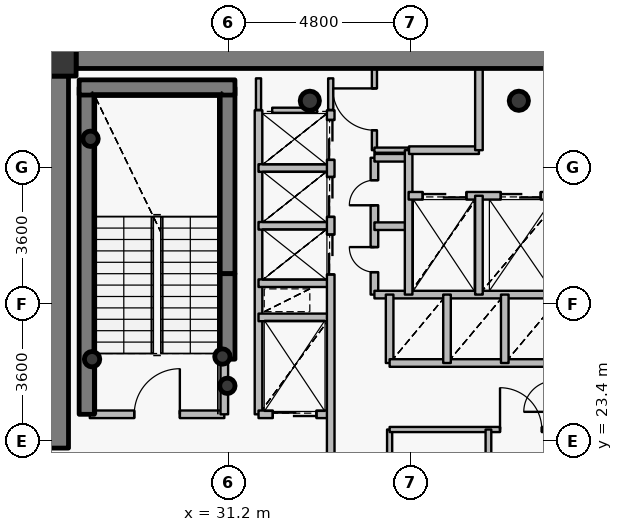
"""IFC4 building model, lengths in metres.
Left out: names, types, materials, properties, quantities, classifications, styles, units other than length and angle.
Written with IfcOpenShell. Run it as: python <this file> out.ifc"""

import sys

from ifc_helpers import new_model, si_unit, direction, frame, frame_2d, origin, origin_2d, place, context, subcontext, project, spatial, rectangle, hollow_circle, extrude, source, transform, mapped, element, fill, save


model = new_model("IFC4")
c1 = context("Model", 3, precision=1e-05, world=origin(), true_north=direction((0.0, 1.0)))
c2 = subcontext(c1, "Body", "Model", "MODEL_VIEW")
j1 = project(units=[si_unit("LENGTHUNIT", "METRE"), si_unit("PLANEANGLEUNIT", "RADIAN")], contexts=[c1])
p1 = place(None, origin())
s1 = spatial("IfcSite", under=j1, at=p1, CompositionType="ELEMENT")
p2 = place(p1, origin())
s2 = spatial("IfcBuilding", under=s1, at=p2, CompositionType="ELEMENT")
p3 = place(p2, frame((0.0, 0.0, 193.65)))
s3 = spatial("IfcBuildingStorey", under=s2, at=p3, CompositionType="ELEMENT", Elevation=193.65)
p4 = place(p3, frame((26.6, 33.6, 0.0), z_axis=(0.0, 0.0, 1.0), x_axis=(1.0, 0.0, 0.0)))
e1 = element("IfcColumn", 1, at=p4, inside=s3, PredefinedType="COLUMN", context=c2, shape_type="SweptSolid", body=[
    extrude(rectangle(XDim=1.2, YDim=1.2, at=origin_2d()), origin(), (0.0, 0.0, 1.0), 3.75),
])
for number, where, z_axis, x_axis in (
    (2, (38.85, 32.35, 0.0), (0.0, 0.0, 1.0), (1.0, 0.0, 0.0)),
    (3, (33.35, 32.35, 0.0), (0.0, 0.0, 1.0), (1.0, 0.0, 0.0)),
):
    element("IfcColumn", number, at=place(p3, frame(where, z_axis=z_axis, x_axis=x_axis)), inside=s3, PredefinedType="COLUMN", context=c2, shape_type="SweptSolid", body=[
        extrude(hollow_circle(Radius=0.254, WallThickness=0.02, at=origin_2d()), origin(), (0.0, 0.0, 1.0), 3.75),
    ])
p5 = place(p3, frame((27.48, 24.1, 0.0), z_axis=(0.0, 0.0, 1.0), x_axis=(0.0, 1.0, 0.0)))
e4 = element("IfcWall", 4, at=p5, inside=s3, PredefinedType="SHEAR", context=c2, shape_type="SweptSolid", body=[
    extrude(rectangle(XDim=8.6, YDim=0.4, at=frame_2d((4.3, 0.0))), origin(), (0.0, 0.0, 1.0), 3.75),
])
p6 = place(p3, frame((31.18, 27.8, 0.0), z_axis=(0.0, 0.0, 1.0), x_axis=(0.0, 1.0, 0.0)))
e5 = element("IfcWall", 5, at=p6, inside=s3, PredefinedType="SHEAR", context=c2, shape_type="SweptSolid", body=[
    extrude(rectangle(XDim=4.9, YDim=0.4, at=frame_2d((2.45, 0.0))), origin(), (0.0, 0.0, 1.0), 3.75),
])
p7 = place(p3, frame((27.28, 32.7, 0.0), z_axis=(0.0, 0.0, 1.0), x_axis=(1.0, 0.0, 0.0)))
e6 = element("IfcWall", 6, at=p7, inside=s3, PredefinedType="SHEAR", context=c2, shape_type="SweptSolid", body=[
    extrude(rectangle(XDim=4.1, YDim=0.4, at=frame_2d((2.05, 0.0))), origin(), (0.0, 0.0, 1.0), 3.75),
])
for number, where, z_axis, x_axis in (
    (7, (27.58, 31.35, 0.0), (0.0, 0.0, 1.0), (1.0, 0.0, 0.0)),
    (8, (31.05, 25.62, 0.0), (0.0, 0.0, 1.0), (1.0, 0.0, 0.0)),
    (9, (31.18, 24.85, 0.0), (0.0, 0.0, 1.0), (1.0, 0.0, 0.0)),
    (10, (27.62, 25.55, 0.0), (0.0, 0.0, 1.0), (1.0, 0.0, 0.0)),
):
    element("IfcColumn", number, at=place(p3, frame(where, z_axis=z_axis, x_axis=x_axis)), inside=s3, PredefinedType="COLUMN", context=c2, shape_type="SweptSolid", body=[
        extrude(hollow_circle(Radius=0.203, WallThickness=0.016, at=origin_2d()), origin(), (0.0, 0.0, 1.0), 3.75),
    ])
p8 = place(p3, frame((27.2, 33.6, 0.0), z_axis=(0.0, 0.0, 1.0), x_axis=(1.0, 0.0, 0.0)))
e11 = element("IfcWall", 11, at=p8, inside=s3, PredefinedType="SHEAR", context=c2, shape_type="SweptSolid", body=[
    extrude(rectangle(XDim=17.6, YDim=0.8, at=frame_2d((8.8, 0.0))), origin(), (0.0, 0.0, 1.0), 2.95),
])
p9 = place(p8, frame((13.45, 0.0, 0.0)))
e12 = element("IfcOpeningElement", 12, at=p9, cuts=e11, PredefinedType="OPENING", context=c2, shape_type="SweptSolid", body=[
    extrude(rectangle(XDim=1.15, YDim=2.15, at=origin_2d()), frame((0.575, 0.41, 1.075), z_axis=(0.0, -1.0, 0.0), x_axis=(1.0, 0.0, 0.0)), (0.0, 0.0, 1.0), 0.82),
])
p10 = place(p3, frame((26.6, 21.0, 0.0), z_axis=(0.0, 0.0, 1.0), x_axis=(0.0, 1.0, 0.0)))
e13 = element("IfcWall", 13, at=p10, inside=s3, PredefinedType="SHEAR", context=c2, shape_type="SweptSolid", body=[
    extrude(rectangle(XDim=12.0, YDim=0.8, at=frame_2d((6.0, 0.0))), origin(), (0.0, 0.0, 1.0), 2.95),
])
p11 = place(p10, frame((1.061, 0.0, 0.0)))
e14 = element("IfcOpeningElement", 14, at=p11, cuts=e13, PredefinedType="OPENING", context=c2, shape_type="SweptSolid", body=[
    extrude(rectangle(XDim=1.15, YDim=2.15, at=origin_2d()), frame((0.575, 0.41, 1.075), z_axis=(0.0, -1.0, 0.0), x_axis=(1.0, 0.0, 0.0)), (0.0, 0.0, 1.0), 0.82),
])
p12 = place(p3, frame((31.18, 25.55, 0.0), z_axis=(0.0, 0.0, 1.0), x_axis=(0.0, 1.0, 0.0)))
e15 = element("IfcWall", 15, at=p12, inside=s3, PredefinedType="SHEAR", context=c2, shape_type="SweptSolid", body=[
    extrude(rectangle(XDim=2.25, YDim=0.4, at=frame_2d((1.125, 0.0))), origin(), (0.0, 0.0, 1.0), 3.1),
])
p13 = place(p3, frame((27.56, 24.1, 0.0), z_axis=(0.0, 0.0, 1.0), x_axis=(1.0, 0.0, 0.0)))
e16 = element("IfcWall", 16, at=p13, inside=s3, PredefinedType="PARTITIONING", context=c2, shape_type="SweptSolid", body=[
    extrude(rectangle(XDim=3.54, YDim=0.2, at=frame_2d((1.77, 0.0))), origin(), (0.0, 0.0, 1.0), 3.5),
])
p14 = place(p13, frame((1.17, 0.0, 0.0)))
e17 = element("IfcOpeningElement", 17, at=p14, cuts=e16, PredefinedType="OPENING", context=c2, shape_type="SweptSolid", body=[
    extrude(rectangle(XDim=1.2, YDim=2.15, at=origin_2d()), frame((0.6, 0.11, 1.075), z_axis=(0.0, -1.0, 0.0), x_axis=(1.0, 0.0, 0.0)), (0.0, 0.0, 1.0), 0.22),
])
p15 = place(p3, frame((31.1, 24.1, 0.0), z_axis=(0.0, 0.0, 1.0), x_axis=(0.0, 1.0, 0.0)))
e18 = element("IfcWall", 18, at=p15, inside=s3, PredefinedType="PARTITIONING", context=c2, shape_type="SweptSolid", body=[
    extrude(rectangle(XDim=1.44, YDim=0.2, at=frame_2d((0.72, 0.0))), origin(), (0.0, 0.0, 1.0), 3.5),
])
p16 = place(p3, frame((32.0, 24.1, 0.0), z_axis=(0.0, 0.0, 1.0), x_axis=(0.0, 1.0, 0.0)))
e19 = element("IfcWall", 19, at=p16, inside=s3, PredefinedType="PARTITIONING", context=c2, shape_type="SweptSolid", body=[
    extrude(rectangle(XDim=8.0, YDim=0.2, at=frame_2d((4.0, 0.0))), origin(), (0.0, 0.0, 1.0), 3.5),
])
p17 = place(p3, frame((32.0, 24.1, 0.0), z_axis=(0.0, 0.0, 1.0), x_axis=(1.0, 0.0, 0.0)))
e20 = element("IfcWall", 20, at=p17, inside=s3, PredefinedType="PARTITIONING", context=c2, shape_type="SweptSolid", body=[
    extrude(rectangle(XDim=1.9, YDim=0.2, at=frame_2d((0.95, 0.0))), origin(), (0.0, 0.0, 1.0), 3.085),
])
p18 = place(p17, frame((0.375, 0.0, 0.0)))
e21 = element("IfcOpeningElement", 21, at=p18, cuts=e20, PredefinedType="OPENING", context=c2, shape_type="SweptSolid", body=[
    extrude(rectangle(XDim=1.15, YDim=2.15, at=origin_2d()), frame((0.575, 0.11, 1.075), z_axis=(0.0, -1.0, 0.0), x_axis=(1.0, 0.0, 0.0)), (0.0, 0.0, 1.0), 0.22),
])
for number, where, z_axis, x_axis in (
    (22, (32.0, 26.65, 0.0), (0.0, 0.0, 1.0), (1.0, 0.0, 0.0)),
    (23, (32.0, 27.55, 0.0), (0.0, 0.0, 1.0), (1.0, 0.0, 0.0)),
    (24, (32.0, 29.06, 0.0), (0.0, 0.0, 1.0), (1.0, 0.0, 0.0)),
    (25, (32.0, 30.58, 0.0), (0.0, 0.0, 1.0), (1.0, 0.0, 0.0)),
):
    element("IfcWall", number, at=place(p3, frame(where, z_axis=z_axis, x_axis=x_axis)), inside=s3, PredefinedType="PARTITIONING", context=c2, shape_type="SweptSolid", body=[
        extrude(rectangle(XDim=1.9, YDim=0.2, at=frame_2d((0.95, 0.0))), origin(), (0.0, 0.0, 1.0), 3.085),
    ])
p19 = place(p3, frame((33.9, 20.8, 0.0), z_axis=(0.0, 0.0, 1.0), x_axis=(0.0, 1.0, 0.0)))
e26 = element("IfcWall", 26, at=p19, inside=s3, PredefinedType="PARTITIONING", context=c2, shape_type="SweptSolid", body=[
    extrude(rectangle(XDim=11.3, YDim=0.2, at=frame_2d((5.65, 0.0))), origin(), (0.0, 0.0, 1.0), 3.085),
])
p20 = place(p19, frame((6.98, 0.0, 0.0)))
e27 = element("IfcOpeningElement", 27, at=p20, cuts=e26, PredefinedType="OPENING", context=c2, shape_type="SweptSolid", body=[
    extrude(rectangle(XDim=1.05, YDim=2.15, at=origin_2d()), frame((0.525, 0.11, 1.075), z_axis=(0.0, -1.0, 0.0), x_axis=(1.0, 0.0, 0.0)), (0.0, 0.0, 1.0), 0.22),
])
p21 = place(p19, frame((8.495, 0.0, 0.0)))
e28 = element("IfcOpeningElement", 28, at=p21, cuts=e26, PredefinedType="OPENING", context=c2, shape_type="SweptSolid", body=[
    extrude(rectangle(XDim=1.05, YDim=2.15, at=origin_2d()), frame((0.525, 0.11, 1.075), z_axis=(0.0, -1.0, 0.0), x_axis=(1.0, 0.0, 0.0)), (0.0, 0.0, 1.0), 0.22),
])
p22 = place(p19, frame((9.995, 0.0, 0.0)))
e29 = element("IfcOpeningElement", 29, at=p22, cuts=e26, PredefinedType="OPENING", context=c2, shape_type="SweptSolid", body=[
    extrude(rectangle(XDim=1.05, YDim=2.15, at=origin_2d()), frame((0.525, 0.11, 1.075), z_axis=(0.0, -1.0, 0.0), x_axis=(1.0, 0.0, 0.0)), (0.0, 0.0, 1.0), 0.22),
])
p23 = place(p3, frame((35.05, 27.25, 0.0), z_axis=(0.0, 0.0, 1.0), x_axis=(0.0, 1.0, 0.0)))
e30 = element("IfcWall", 30, at=p23, inside=s3, PredefinedType="PARTITIONING", context=c2, shape_type="SweptSolid", body=[
    extrude(rectangle(XDim=3.6, YDim=0.2, at=frame_2d((1.8, 0.0))), origin(), (0.0, 0.0, 1.0), 3.5),
])
p24 = place(p23, frame((0.59, 0.0, 0.0)))
e31 = element("IfcOpeningElement", 31, at=p24, cuts=e30, PredefinedType="OPENING", context=c2, shape_type="SweptSolid", body=[
    extrude(rectangle(XDim=0.66, YDim=2.05, at=origin_2d()), frame((0.33, 0.11, 1.025), z_axis=(0.0, -1.0, 0.0), x_axis=(1.0, 0.0, 0.0)), (0.0, 0.0, 1.0), 0.22),
])
p25 = place(p23, frame((2.35, 0.0, 0.0)))
e32 = element("IfcOpeningElement", 32, at=p25, cuts=e30, PredefinedType="OPENING", context=c2, shape_type="SweptSolid", body=[
    extrude(rectangle(XDim=0.66, YDim=2.05, at=origin_2d()), frame((0.33, 0.11, 1.025), z_axis=(0.0, -1.0, 0.0), x_axis=(1.0, 0.0, 0.0)), (0.0, 0.0, 1.0), 0.22),
])
p26 = place(p3, frame((35.05, 27.25, 0.0), z_axis=(0.0, 0.0, 1.0), x_axis=(1.0, 0.0, 0.0)))
e33 = element("IfcWall", 33, at=p26, inside=s3, PredefinedType="PARTITIONING", context=c2, shape_type="SweptSolid", body=[
    extrude(rectangle(XDim=4.95, YDim=0.2, at=frame_2d((2.475, 0.0))), origin(), (0.0, 0.0, 1.0), 3.085),
])
for number, where, z_axis, x_axis in (
    (34, (35.05, 29.05, 0.0), (0.0, 0.0, 1.0), (1.0, 0.0, 0.0)),
    (35, (35.05, 30.85, 0.0), (0.0, 0.0, 1.0), (1.0, 0.0, 0.0)),
):
    element("IfcWall", number, at=place(p3, frame(where, z_axis=z_axis, x_axis=x_axis)), inside=s3, PredefinedType="PARTITIONING", context=c2, shape_type="SweptSolid", body=[
        extrude(rectangle(XDim=0.9, YDim=0.2, at=frame_2d((0.45, 0.0))), origin(), (0.0, 0.0, 1.0), 3.5),
    ])
p27 = place(p3, frame((35.05, 31.05, 0.0), z_axis=(0.0, 0.0, 1.0), x_axis=(0.0, 1.0, 0.0)))
e36 = element("IfcWall", 36, at=p27, inside=s3, PredefinedType="PARTITIONING", context=c2, shape_type="SweptSolid", body=[
    extrude(rectangle(XDim=2.15, YDim=0.135, at=frame_2d((1.075, 0.0))), origin(), (0.0, 0.0, 1.0), 3.085),
])
p28 = place(p27, frame((0.525, 0.0, 0.0)))
e37 = element("IfcOpeningElement", 37, at=p28, cuts=e36, PredefinedType="OPENING", context=c2, shape_type="SweptSolid", body=[
    extrude(rectangle(XDim=1.1, YDim=2.15, at=origin_2d()), frame((0.55, 0.078, 1.075), z_axis=(0.0, -1.0, 0.0), x_axis=(1.0, 0.0, 0.0)), (0.0, 0.0, 1.0), 0.155),
])
p29 = place(p3, frame((35.05, 31.05, 0.0), z_axis=(0.0, 0.0, 1.0), x_axis=(1.0, 0.0, 0.0)))
e38 = element("IfcWall", 38, at=p29, inside=s3, PredefinedType="PARTITIONING", context=c2, shape_type="SweptSolid", body=[
    extrude(rectangle(XDim=0.9, YDim=0.135, at=frame_2d((0.45, 0.0))), origin(), (0.0, 0.0, 1.0), 3.5),
])
p30 = place(p3, frame((35.45, 20.8, 0.0), z_axis=(0.0, 0.0, 1.0), x_axis=(0.0, 1.0, 0.0)))
e39 = element("IfcWall", 39, at=p30, inside=s3, PredefinedType="PARTITIONING", context=c2, shape_type="SweptSolid", body=[
    extrude(rectangle(XDim=2.9, YDim=0.135, at=frame_2d((1.45, 0.0))), origin(), (0.0, 0.0, 1.0), 3.085),
])
p31 = place(p30, frame((0.9, 0.0, 0.0)))
e40 = element("IfcOpeningElement", 40, at=p31, cuts=e39, PredefinedType="OPENING", context=c2, shape_type="SweptSolid", body=[
    extrude(rectangle(XDim=1.1, YDim=2.15, at=origin_2d()), frame((0.55, 0.078, 1.075), z_axis=(0.0, -1.0, 0.0), x_axis=(1.0, 0.0, 0.0)), (0.0, 0.0, 1.0), 0.155),
])
p32 = place(p3, frame((35.45, 23.7, 0.0), z_axis=(0.0, 0.0, 1.0), x_axis=(1.0, 0.0, 0.0)))
e41 = element("IfcWall", 41, at=p32, inside=s3, PredefinedType="PARTITIONING", context=c2, shape_type="SweptSolid", body=[
    extrude(rectangle(XDim=4.35, YDim=0.135, at=frame_2d((2.175, 0.0))), origin(), (0.0, 0.0, 1.0), 3.085),
])
p33 = place(p32, frame((2.905, 0.0, 0.0)))
e42 = element("IfcOpeningElement", 42, at=p33, cuts=e41, PredefinedType="OPENING", context=c2, shape_type="SweptSolid", body=[
    extrude(rectangle(XDim=1.1, YDim=2.15, at=origin_2d()), frame((0.55, 0.078, 1.075), z_axis=(0.0, -1.0, 0.0), x_axis=(1.0, 0.0, 0.0)), (0.0, 0.0, 1.0), 0.155),
])
p34 = place(p3, frame((35.45, 25.45, 0.0), z_axis=(0.0, 0.0, 1.0), x_axis=(0.0, 1.0, 0.0)))
e43 = element("IfcWall", 43, at=p34, inside=s3, PredefinedType="PARTITIONING", context=c2, shape_type="SweptSolid", body=[
    extrude(rectangle(XDim=1.8, YDim=0.2, at=frame_2d((0.9, 0.0))), origin(), (0.0, 0.0, 1.0), 3.5),
])
p35 = place(p3, frame((35.45, 25.45, 0.0), z_axis=(0.0, 0.0, 1.0), x_axis=(1.0, 0.0, 0.0)))
e44 = element("IfcWall", 44, at=p35, inside=s3, PredefinedType="PARTITIONING", context=c2, shape_type="SweptSolid", body=[
    extrude(rectangle(XDim=4.55, YDim=0.2, at=frame_2d((2.275, 0.0))), origin(), (0.0, 0.0, 1.0), 3.085),
])
p36 = place(p3, frame((35.95, 27.25, 0.0), z_axis=(0.0, 0.0, 1.0), x_axis=(0.0, 1.0, 0.0)))
e45 = element("IfcWall", 45, at=p36, inside=s3, PredefinedType="PARTITIONING", context=c2, shape_type="SweptSolid", body=[
    extrude(rectangle(XDim=3.8, YDim=0.2, at=frame_2d((1.9, 0.0))), origin(), (0.0, 0.0, 1.0), 3.5),
])
p37 = place(p3, frame((35.95, 29.85, 0.0), z_axis=(0.0, 0.0, 1.0), x_axis=(1.0, 0.0, 0.0)))
e46 = element("IfcWall", 46, at=p37, inside=s3, PredefinedType="PARTITIONING", context=c2, shape_type="SweptSolid", body=[
    extrude(rectangle(XDim=8.49, YDim=0.2, at=frame_2d((4.245, 0.0))), origin(), (0.0, 0.0, 1.0), 3.085),
])
p38 = place(p37, frame((6.1, 0.0, 0.0)))
e47 = element("IfcOpeningElement", 47, at=p38, cuts=e46, PredefinedType="OPENING", context=c2, shape_type="SweptSolid", body=[
    extrude(rectangle(XDim=1.2, YDim=2.15, at=origin_2d()), frame((0.6, 0.11, 1.075), z_axis=(0.0, -1.0, 0.0), x_axis=(1.0, 0.0, 0.0)), (0.0, 0.0, 1.0), 0.22),
])
p39 = place(p37, frame((0.37, 0.0, 0.0)))
e48 = element("IfcOpeningElement", 48, at=p39, cuts=e46, PredefinedType="OPENING", context=c2, shape_type="SweptSolid", body=[
    extrude(rectangle(XDim=1.15, YDim=2.15, at=origin_2d()), frame((0.575, 0.11, 1.075), z_axis=(0.0, -1.0, 0.0), x_axis=(1.0, 0.0, 0.0)), (0.0, 0.0, 1.0), 0.22),
])
p40 = place(p37, frame((2.425, 0.0, 0.0)))
e49 = element("IfcOpeningElement", 49, at=p40, cuts=e46, PredefinedType="OPENING", context=c2, shape_type="SweptSolid", body=[
    extrude(rectangle(XDim=1.05, YDim=2.15, at=origin_2d()), frame((0.525, 0.11, 1.075), z_axis=(0.0, -1.0, 0.0), x_axis=(1.0, 0.0, 0.0)), (0.0, 0.0, 1.0), 0.22),
])
p41 = place(p3, frame((35.96, 31.05, 0.0), z_axis=(0.0, 0.0, 1.0), x_axis=(1.0, 0.0, 0.0)))
e50 = element("IfcWall", 50, at=p41, inside=s3, PredefinedType="PARTITIONING", context=c2, shape_type="SweptSolid", body=[
    extrude(rectangle(XDim=1.84, YDim=0.2, at=frame_2d((0.92, 0.0))), origin(), (0.0, 0.0, 1.0), 3.5),
])
p42 = place(p3, frame((36.96, 25.45, 0.0), z_axis=(0.0, 0.0, 1.0), x_axis=(0.0, 1.0, 0.0)))
e51 = element("IfcWall", 51, at=p42, inside=s3, PredefinedType="PARTITIONING", context=c2, shape_type="SweptSolid", body=[
    extrude(rectangle(XDim=1.8, YDim=0.2, at=frame_2d((0.9, 0.0))), origin(), (0.0, 0.0, 1.0), 3.5),
])
p43 = place(p3, frame((37.8, 27.25, 0.0), z_axis=(0.0, 0.0, 1.0), x_axis=(0.0, 1.0, 0.0)))
e52 = element("IfcWall", 52, at=p43, inside=s3, PredefinedType="PARTITIONING", context=c2, shape_type="SweptSolid", body=[
    extrude(rectangle(XDim=2.6, YDim=0.2, at=frame_2d((1.3, 0.0))), origin(), (0.0, 0.0, 1.0), 3.5),
])
p44 = place(p3, frame((37.8, 31.05, 0.0), z_axis=(0.0, 0.0, 1.0), x_axis=(0.0, 1.0, 0.0)))
e53 = element("IfcWall", 53, at=p44, inside=s3, PredefinedType="PARTITIONING", context=c2, shape_type="SweptSolid", body=[
    extrude(rectangle(XDim=2.15, YDim=0.2, at=frame_2d((1.075, 0.0))), origin(), (0.0, 0.0, 1.0), 3.085),
])
p45 = place(p3, frame((38.05, 20.18, 0.0), z_axis=(0.0, 0.0, 1.0), x_axis=(0.0, 1.0, 0.0)))
e54 = element("IfcWall", 54, at=p45, inside=s3, PredefinedType="PARTITIONING", context=c2, shape_type="SweptSolid", body=[
    extrude(rectangle(XDim=3.52, YDim=0.15, at=frame_2d((1.76, 0.0))), origin(), (0.0, 0.0, 1.0), 2.935),
])
p46 = place(p3, frame((38.48, 25.45, 0.0), z_axis=(0.0, 0.0, 1.0), x_axis=(0.0, 1.0, 0.0)))
e55 = element("IfcWall", 55, at=p46, inside=s3, PredefinedType="PARTITIONING", context=c2, shape_type="SweptSolid", body=[
    extrude(rectangle(XDim=1.8, YDim=0.2, at=frame_2d((0.9, 0.0))), origin(), (0.0, 0.0, 1.0), 3.5),
])
p47 = place(p3, frame((32.36, 32.1, 0.0), z_axis=(0.0, 0.0, 1.0), x_axis=(1.0, 0.0, 0.0)))
e56 = element("IfcWall", 56, at=p47, inside=s3, PredefinedType="PARTITIONING", context=c2, shape_type="SweptSolid", body=[
    extrude(rectangle(XDim=1.18, YDim=0.135, at=frame_2d((0.59, 0.0))), origin(), (0.0, 0.0, 1.0), 3.085),
])
p48 = place(p3, frame((32.0, 32.94, 0.0), z_axis=(0.0, 0.0, 1.0), x_axis=(0.0, -1.0, 0.0)))
e57 = element("IfcWall", 57, at=p48, inside=s3, PredefinedType="PARTITIONING", context=c2, shape_type="SweptSolid", body=[
    extrude(rectangle(XDim=0.83, YDim=0.135, at=frame_2d((0.415, 0.0))), origin(), (0.0, 0.0, 1.0), 3.035),
])
p49 = place(p3, frame((33.9, 32.11, 0.0), z_axis=(0.0, 0.0, 1.0), x_axis=(0.0, 1.0, 0.0)))
e58 = element("IfcWall", 58, at=p49, inside=s3, PredefinedType="PARTITIONING", context=c2, shape_type="SweptSolid", body=[
    extrude(rectangle(XDim=0.83, YDim=0.135, at=frame_2d((0.415, 0.0))), origin(), (0.0, 0.0, 1.0), 3.085),
])
m1 = source(origin(), c2, "Body", "SweptSolid", [
    extrude(rectangle(XDim=1.15, YDim=2.15, at=origin_2d()), frame((0.575, 0.025, 1.075), z_axis=(0.0, -1.0, 0.0), x_axis=(1.0, 0.0, 0.0)), (0.0, 0.0, 1.0), 0.05),
])
p50 = place(p11, origin())
e59 = element("IfcDoor", 59, at=p50, inside=s3, OperationType="SINGLE_SWING_LEFT", PredefinedType="DOOR", context=c2, shape_type="MappedRepresentation", body=[
    mapped(m1, transform((0.0, 0.0, 0.0), x_axis=(1.0, 0.0, 0.0), y_axis=(0.0, 1.0, 0.0), z_axis=(0.0, 0.0, 1.0), scale=1.0)),
])
fill(e14, e59)
m2 = source(origin(), c2, "Body", "SweptSolid", [
    extrude(rectangle(XDim=1.2, YDim=2.15, at=origin_2d()), frame((0.6, 0.025, 1.075), z_axis=(0.0, -1.0, 0.0), x_axis=(1.0, 0.0, 0.0)), (0.0, 0.0, 1.0), 0.05),
])
p51 = place(p14, origin())
e60 = element("IfcDoor", 60, at=p51, inside=s3, OperationType="SINGLE_SWING_RIGHT", PredefinedType="DOOR", context=c2, shape_type="MappedRepresentation", body=[
    mapped(m2, transform((0.0, 0.0, 0.0), x_axis=(1.0, 0.0, 0.0), y_axis=(0.0, 1.0, 0.0), z_axis=(0.0, 0.0, 1.0), scale=1.0)),
])
fill(e17, e60)
m3 = source(origin(), c2, "Body", "SweptSolid", [
    extrude(rectangle(XDim=1.15, YDim=2.15, at=origin_2d()), frame((0.575, 0.025, 1.075), z_axis=(0.0, -1.0, 0.0), x_axis=(1.0, 0.0, 0.0)), (0.0, 0.0, 1.0), 0.05),
])
p52 = place(p39, origin())
e61 = element("IfcDoor", 61, at=p52, inside=s3, OperationType="DOUBLE_DOOR_SLIDING", PredefinedType="USERDEFINED", context=c2, shape_type="MappedRepresentation", body=[
    mapped(m3, transform((0.0, 0.0, 0.0), x_axis=(1.0, 0.0, 0.0), y_axis=(0.0, 1.0, 0.0), z_axis=(0.0, 0.0, 1.0), scale=1.0)),
])
fill(e48, e61)
p53 = place(p18, origin())
e62 = element("IfcDoor", 62, at=p53, inside=s3, OperationType="DOUBLE_DOOR_SLIDING", PredefinedType="USERDEFINED", context=c2, shape_type="MappedRepresentation", body=[
    mapped(m3, transform((0.0, 0.0, 0.0), x_axis=(1.0, 0.0, 0.0), y_axis=(0.0, 1.0, 0.0), z_axis=(0.0, 0.0, 1.0), scale=1.0)),
])
fill(e21, e62)
m4 = source(origin(), c2, "Body", "SweptSolid", [
    extrude(rectangle(XDim=1.05, YDim=2.15, at=origin_2d()), frame((0.525, 0.025, 1.075), z_axis=(0.0, -1.0, 0.0), x_axis=(1.0, 0.0, 0.0)), (0.0, 0.0, 1.0), 0.05),
])
p54 = place(p40, origin())
e63 = element("IfcDoor", 63, at=p54, inside=s3, OperationType="DOUBLE_DOOR_SLIDING", PredefinedType="USERDEFINED", context=c2, shape_type="MappedRepresentation", body=[
    mapped(m4, transform((0.0, 0.0, 0.0), x_axis=(1.0, 0.0, 0.0), y_axis=(0.0, 1.0, 0.0), z_axis=(0.0, 0.0, 1.0), scale=1.0)),
])
fill(e49, e63)
p55 = place(p20, origin())
e64 = element("IfcDoor", 64, at=p55, inside=s3, OperationType="DOUBLE_DOOR_SLIDING", PredefinedType="USERDEFINED", context=c2, shape_type="MappedRepresentation", body=[
    mapped(m4, transform((0.0, 0.0, 0.0), x_axis=(1.0, 0.0, 0.0), y_axis=(0.0, 1.0, 0.0), z_axis=(0.0, 0.0, 1.0), scale=1.0)),
])
fill(e27, e64)
p56 = place(p21, origin())
e65 = element("IfcDoor", 65, at=p56, inside=s3, OperationType="DOUBLE_DOOR_SLIDING", PredefinedType="USERDEFINED", context=c2, shape_type="MappedRepresentation", body=[
    mapped(m4, transform((0.0, 0.0, 0.0), x_axis=(1.0, 0.0, 0.0), y_axis=(0.0, 1.0, 0.0), z_axis=(0.0, 0.0, 1.0), scale=1.0)),
])
fill(e28, e65)
p57 = place(p22, origin())
e66 = element("IfcDoor", 66, at=p57, inside=s3, OperationType="DOUBLE_DOOR_SLIDING", PredefinedType="USERDEFINED", context=c2, shape_type="MappedRepresentation", body=[
    mapped(m4, transform((0.0, 0.0, 0.0), x_axis=(1.0, 0.0, 0.0), y_axis=(0.0, 1.0, 0.0), z_axis=(0.0, 0.0, 1.0), scale=1.0)),
])
fill(e29, e66)
m5 = source(origin(), c2, "Body", "SweptSolid", [
    extrude(rectangle(XDim=0.66, YDim=2.05, at=origin_2d()), frame((0.33, 0.025, 1.025), z_axis=(0.0, -1.0, 0.0), x_axis=(1.0, 0.0, 0.0)), (0.0, 0.0, 1.0), 0.05),
])
p58 = place(p24, origin())
e67 = element("IfcDoor", 67, at=p58, inside=s3, OperationType="SINGLE_SWING_RIGHT", PredefinedType="USERDEFINED", context=c2, shape_type="MappedRepresentation", body=[
    mapped(m5, transform((0.0, 0.0, 0.0), x_axis=(1.0, 0.0, 0.0), y_axis=(0.0, 1.0, 0.0), z_axis=(0.0, 0.0, 1.0), scale=1.0)),
])
fill(e31, e67)
p59 = place(p25, origin())
e68 = element("IfcDoor", 68, at=p59, inside=s3, OperationType="SINGLE_SWING_LEFT", PredefinedType="USERDEFINED", context=c2, shape_type="MappedRepresentation", body=[
    mapped(m5, transform((0.0, 0.0, 0.0), x_axis=(1.0, 0.0, 0.0), y_axis=(0.0, 1.0, 0.0), z_axis=(0.0, 0.0, 1.0), scale=1.0)),
])
fill(e32, e68)
m6 = source(origin(), c2, "Body", "SweptSolid", [
    extrude(rectangle(XDim=1.1, YDim=2.15, at=origin_2d()), frame((0.55, 0.025, 1.075), z_axis=(0.0, -1.0, 0.0), x_axis=(1.0, 0.0, 0.0)), (0.0, 0.0, 1.0), 0.05),
])
p60 = place(p33, origin())
e69 = element("IfcDoor", 69, at=p60, inside=s3, OperationType="SINGLE_SWING_LEFT", PredefinedType="DOOR", context=c2, shape_type="MappedRepresentation", body=[
    mapped(m6, transform((0.0, 0.0, 0.0), x_axis=(1.0, 0.0, 0.0), y_axis=(0.0, 1.0, 0.0), z_axis=(0.0, 0.0, 1.0), scale=1.0)),
])
fill(e42, e69)
p61 = place(p28, origin())
e70 = element("IfcDoor", 70, at=p61, inside=s3, OperationType="SINGLE_SWING_RIGHT", PredefinedType="DOOR", context=c2, shape_type="MappedRepresentation", body=[
    mapped(m6, transform((0.0, 0.0, 0.0), x_axis=(1.0, 0.0, 0.0), y_axis=(0.0, 1.0, 0.0), z_axis=(0.0, 0.0, 1.0), scale=1.0)),
])
fill(e37, e70)
save(model, sys.argv[1])
